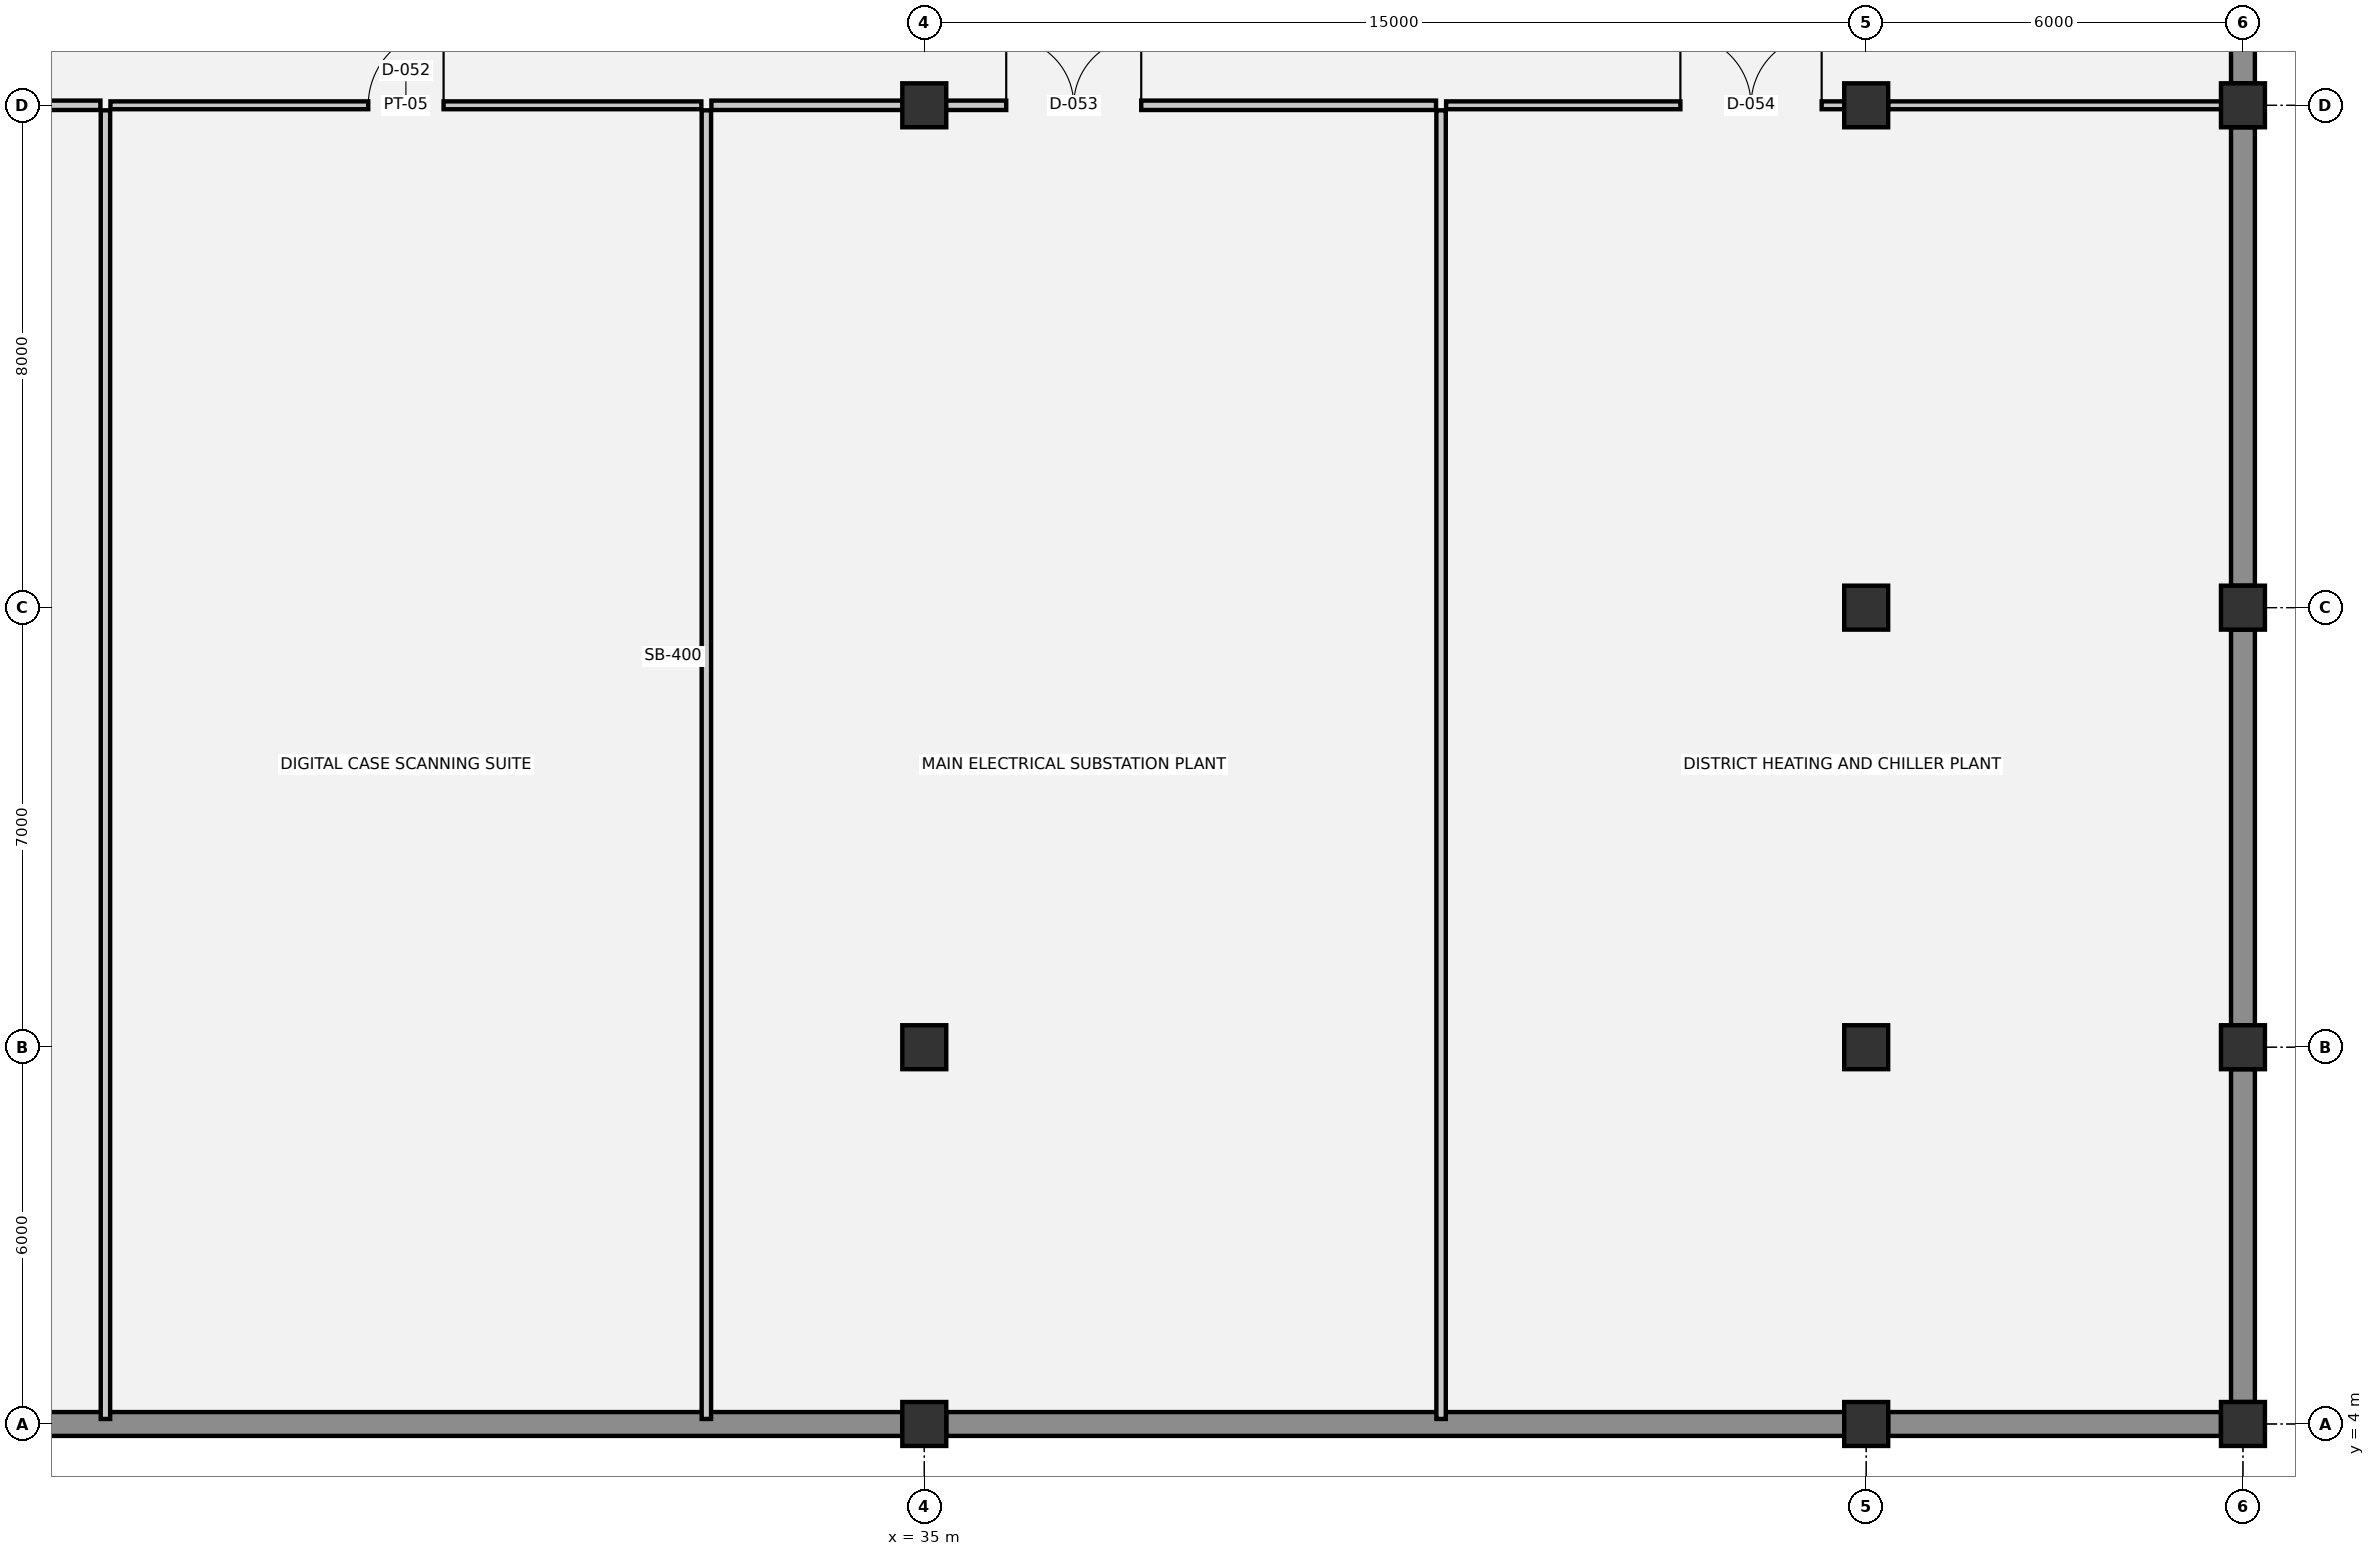
"""IFC4 building model, lengths in metres.
Left out: names, types, materials, properties, quantities, classifications, styles, units other than length and angle.
Written with IfcOpenShell. Run it as: python <this file> out.ifc"""

import sys

from ifc_helpers import new_model, si_unit, direction, frame, frame_2d, origin, origin_2d, place, context, subcontext, project, spatial, rectangle, extrude, element, fill, save


model = new_model("IFC4")
c1 = context("Model", 3, precision=1e-05, world=origin(), true_north=direction((0.0, 1.0)))
c2 = subcontext(c1, "Body", "Model", "MODEL_VIEW")
j1 = project(units=[si_unit("LENGTHUNIT", "METRE"), si_unit("PLANEANGLEUNIT", "RADIAN")], contexts=[c1])
p1 = place(None, origin())
s1 = spatial("IfcSite", under=j1, at=p1, CompositionType="ELEMENT")
p2 = place(p1, origin())
s2 = spatial("IfcBuilding", under=s1, at=p2, CompositionType="ELEMENT")
p3 = place(p2, frame((0.0, 0.0, -4.5)))
s3 = spatial("IfcBuildingStorey", under=s2, at=p3, CompositionType="ELEMENT", Elevation=-4.5)
for number, where, z_axis, x_axis in (
    (1, (35.0, 4.0, 0.0), (0.0, 0.0, 1.0), (1.0, 0.0, 0.0)),
    (2, (35.0, 10.0, 0.0), (0.0, 0.0, 1.0), (1.0, 0.0, 0.0)),
    (3, (35.0, 25.0, 0.0), (0.0, 0.0, 1.0), (1.0, 0.0, 0.0)),
    (4, (50.0, 4.0, 0.0), (0.0, 0.0, 1.0), (1.0, 0.0, 0.0)),
    (5, (50.0, 10.0, 0.0), (0.0, 0.0, 1.0), (1.0, 0.0, 0.0)),
    (6, (50.0, 17.0, 0.0), (0.0, 0.0, 1.0), (1.0, 0.0, 0.0)),
    (7, (50.0, 25.0, 0.0), (0.0, 0.0, 1.0), (1.0, 0.0, 0.0)),
    (8, (56.0, 4.0, 0.0), (0.0, 0.0, 1.0), (1.0, 0.0, 0.0)),
    (9, (56.0, 10.0, 0.0), (0.0, 0.0, 1.0), (1.0, 0.0, 0.0)),
    (10, (56.0, 17.0, 0.0), (0.0, 0.0, 1.0), (1.0, 0.0, 0.0)),
    (11, (56.0, 25.0, 0.0), (0.0, 0.0, 1.0), (1.0, 0.0, 0.0)),
):
    element("IfcColumn", number, at=place(p3, frame(where, z_axis=z_axis, x_axis=x_axis)), inside=s3, PredefinedType="COLUMN", context=c2, shape_type="SweptSolid", body=[
        extrude(rectangle(XDim=0.7, YDim=0.7, at=origin_2d()), origin(), (0.0, 0.0, 1.0), 4.5),
    ])
p4 = place(p3, frame((56.0, 31.65, 0.0), z_axis=(0.0, 0.0, 1.0), x_axis=(0.0, -1.0, 0.0)))
e12 = element("IfcWall", 12, at=p4, inside=s3, PredefinedType="STANDARD", context=c2, shape_type="SweptSolid", body=[
    extrude(rectangle(XDim=6.3, YDim=0.38, at=frame_2d((3.15, 0.0))), origin(), (0.0, 0.0, 1.0), 4.24),
])
p5 = place(p3, frame((56.0, 24.65, 0.0), z_axis=(0.0, 0.0, 1.0), x_axis=(0.0, -1.0, 0.0)))
e13 = element("IfcWall", 13, at=p5, inside=s3, PredefinedType="STANDARD", context=c2, shape_type="SweptSolid", body=[
    extrude(rectangle(XDim=7.3, YDim=0.38, at=frame_2d((3.65, 0.0))), origin(), (0.0, 0.0, 1.0), 4.24),
])
p6 = place(p3, frame((56.0, 16.65, 0.0), z_axis=(0.0, 0.0, 1.0), x_axis=(0.0, -1.0, 0.0)))
e14 = element("IfcWall", 14, at=p6, inside=s3, PredefinedType="STANDARD", context=c2, shape_type="SweptSolid", body=[
    extrude(rectangle(XDim=6.3, YDim=0.38, at=frame_2d((3.15, 0.0))), origin(), (0.0, 0.0, 1.0), 4.24),
])
for number, where, z_axis, x_axis in (
    (15, (56.0, 9.65, 0.0), (0.0, 0.0, 1.0), (0.0, -1.0, 0.0)),
    (16, (55.65, 4.0, 0.0), (0.0, 0.0, 1.0), (-1.0, 0.0, 0.0)),
):
    element("IfcWall", number, at=place(p3, frame(where, z_axis=z_axis, x_axis=x_axis)), inside=s3, PredefinedType="STANDARD", context=c2, shape_type="SweptSolid", body=[
        extrude(rectangle(XDim=5.3, YDim=0.38, at=frame_2d((2.65, 0.0))), origin(), (0.0, 0.0, 1.0), 4.24),
    ])
for number, where, z_axis, x_axis in (
    (17, (49.65, 4.0, 0.0), (0.0, 0.0, 1.0), (-1.0, 0.0, 0.0)),
    (18, (34.65, 4.0, 0.0), (0.0, 0.0, 1.0), (-1.0, 0.0, 0.0)),
):
    element("IfcWall", number, at=place(p3, frame(where, z_axis=z_axis, x_axis=x_axis)), inside=s3, PredefinedType="STANDARD", context=c2, shape_type="SweptSolid", body=[
        extrude(rectangle(XDim=14.3, YDim=0.38, at=frame_2d((7.15, 0.0))), origin(), (0.0, 0.0, 1.0), 4.24),
    ])
p7 = place(p3, frame((20.35, 25.0, 0.0), z_axis=(0.0, 0.0, 1.0), x_axis=(1.0, 0.0, 0.0)))
e19 = element("IfcWall", 19, at=p7, inside=s3, PredefinedType="PARTITIONING", context=c2, shape_type="SweptSolid", body=[
    extrude(rectangle(XDim=1.53, YDim=0.15, at=frame_2d((0.765, 0.0))), origin(), (0.0, 0.0, 1.0), 3.28),
])
p8 = place(p3, frame((22.04, 25.0, 0.0), z_axis=(0.0, 0.0, 1.0), x_axis=(1.0, 0.0, 0.0)))
e20 = element("IfcWall", 20, at=p8, inside=s3, PredefinedType="PARTITIONING", context=c2, shape_type="SweptSolid", body=[
    extrude(rectangle(XDim=9.41, YDim=0.125, at=frame_2d((4.705, 0.0))), origin(), (0.0, 0.0, 1.0), 3.28),
])
p9 = place(p8, frame((4.105, 0.0, 0.0)))
e21 = element("IfcOpeningElement", 21, at=p9, cuts=e20, PredefinedType="OPENING", context=c2, shape_type="SweptSolid", body=[
    extrude(rectangle(XDim=1.2, YDim=2.15, at=frame_2d((0.6, 1.075))), frame((0.0, 0.073, 0.0), z_axis=(0.0, -1.0, 0.0), x_axis=(1.0, 0.0, 0.0)), (0.0, 0.0, 1.0), 0.145),
])
p10 = place(p3, frame((31.61, 25.0, 0.0), z_axis=(0.0, 0.0, 1.0), x_axis=(1.0, 0.0, 0.0)))
e22 = element("IfcWall", 22, at=p10, inside=s3, PredefinedType="PARTITIONING", context=c2, shape_type="SweptSolid", body=[
    extrude(rectangle(XDim=11.54, YDim=0.15, at=frame_2d((5.77, 0.0))), origin(), (0.0, 0.0, 1.0), 3.28),
])
p11 = place(p10, frame((4.695, 0.0, 0.0)))
e23 = element("IfcOpeningElement", 23, at=p11, cuts=e22, PredefinedType="OPENING", context=c2, shape_type="SweptSolid", body=[
    extrude(rectangle(XDim=2.15, YDim=2.4, at=frame_2d((1.075, 1.2))), frame((0.0, 0.085, 0.0), z_axis=(0.0, -1.0, 0.0), x_axis=(1.0, 0.0, 0.0)), (0.0, 0.0, 1.0), 0.17),
])
p12 = place(p3, frame((43.31, 25.0, 0.0), z_axis=(0.0, 0.0, 1.0), x_axis=(1.0, 0.0, 0.0)))
e24 = element("IfcWall", 24, at=p12, inside=s3, PredefinedType="PARTITIONING", context=c2, shape_type="SweptSolid", body=[
    extrude(rectangle(XDim=7.04, YDim=0.125, at=frame_2d((3.52, 0.0))), origin(), (0.0, 0.0, 1.0), 3.28),
])
p13 = place(p12, frame((3.731, 0.0, 0.0)))
e25 = element("IfcOpeningElement", 25, at=p13, cuts=e24, PredefinedType="OPENING", context=c2, shape_type="SweptSolid", body=[
    extrude(rectangle(XDim=2.25, YDim=2.4, at=frame_2d((1.125, 1.2))), frame((0.0, 0.073, 0.0), z_axis=(0.0, -1.0, 0.0), x_axis=(1.0, 0.0, 0.0)), (0.0, 0.0, 1.0), 0.145),
])
p14 = place(p3, frame((50.35, 25.0, 0.0), z_axis=(0.0, 0.0, 1.0), x_axis=(1.0, 0.0, 0.0)))
e26 = element("IfcWall", 26, at=p14, inside=s3, PredefinedType="PARTITIONING", context=c2, shape_type="SweptSolid", body=[
    extrude(rectangle(XDim=5.57, YDim=0.125, at=frame_2d((2.785, 0.0))), origin(), (0.0, 0.0, 1.0), 3.53),
])
for number, where, z_axis, x_axis in (
    (27, (21.96, 4.08, 0.0), (0.0, 0.0, 1.0), (0.0, 1.0, 0.0)),
    (28, (31.53, 4.08, 0.0), (0.0, 0.0, 1.0), (0.0, 1.0, 0.0)),
    (29, (43.23, 4.08, 0.0), (0.0, 0.0, 1.0), (0.0, 1.0, 0.0)),
):
    element("IfcWall", number, at=place(p3, frame(where, z_axis=z_axis, x_axis=x_axis)), inside=s3, PredefinedType="PARTITIONING", context=c2, shape_type="SweptSolid", body=[
        extrude(rectangle(XDim=20.84, YDim=0.15, at=frame_2d((10.42, 0.0))), origin(), (0.0, 0.0, 1.0), 4.14),
    ])
p15 = place(p9, origin())
e30 = element("IfcDoor", 30, at=p15, inside=s3, OperationType="SINGLE_SWING_RIGHT", PredefinedType="DOOR", context=c2, shape_type="SweptSolid", body=[
    extrude(rectangle(XDim=1.2, YDim=2.15, at=frame_2d((0.6, 1.075))), frame((0.0, 0.025, 0.0), z_axis=(0.0, -1.0, 0.0), x_axis=(1.0, 0.0, 0.0)), (0.0, 0.0, 1.0), 0.05),
])
fill(e21, e30)
p16 = place(p11, origin())
e31 = element("IfcDoor", 31, at=p16, inside=s3, OperationType="DOUBLE_DOOR_SINGLE_SWING", PredefinedType="DOOR", context=c2, shape_type="SweptSolid", body=[
    extrude(rectangle(XDim=2.15, YDim=2.4, at=frame_2d((1.075, 1.2))), frame((0.0, 0.025, 0.0), z_axis=(0.0, -1.0, 0.0), x_axis=(1.0, 0.0, 0.0)), (0.0, 0.0, 1.0), 0.05),
])
fill(e23, e31)
p17 = place(p13, origin())
e32 = element("IfcDoor", 32, at=p17, inside=s3, OperationType="DOUBLE_DOOR_SINGLE_SWING", PredefinedType="DOOR", context=c2, shape_type="SweptSolid", body=[
    extrude(rectangle(XDim=2.25, YDim=2.4, at=frame_2d((1.125, 1.2))), frame((0.0, 0.025, 0.0), z_axis=(0.0, -1.0, 0.0), x_axis=(1.0, 0.0, 0.0)), (0.0, 0.0, 1.0), 0.05),
])
fill(e25, e32)
save(model, sys.argv[1])
